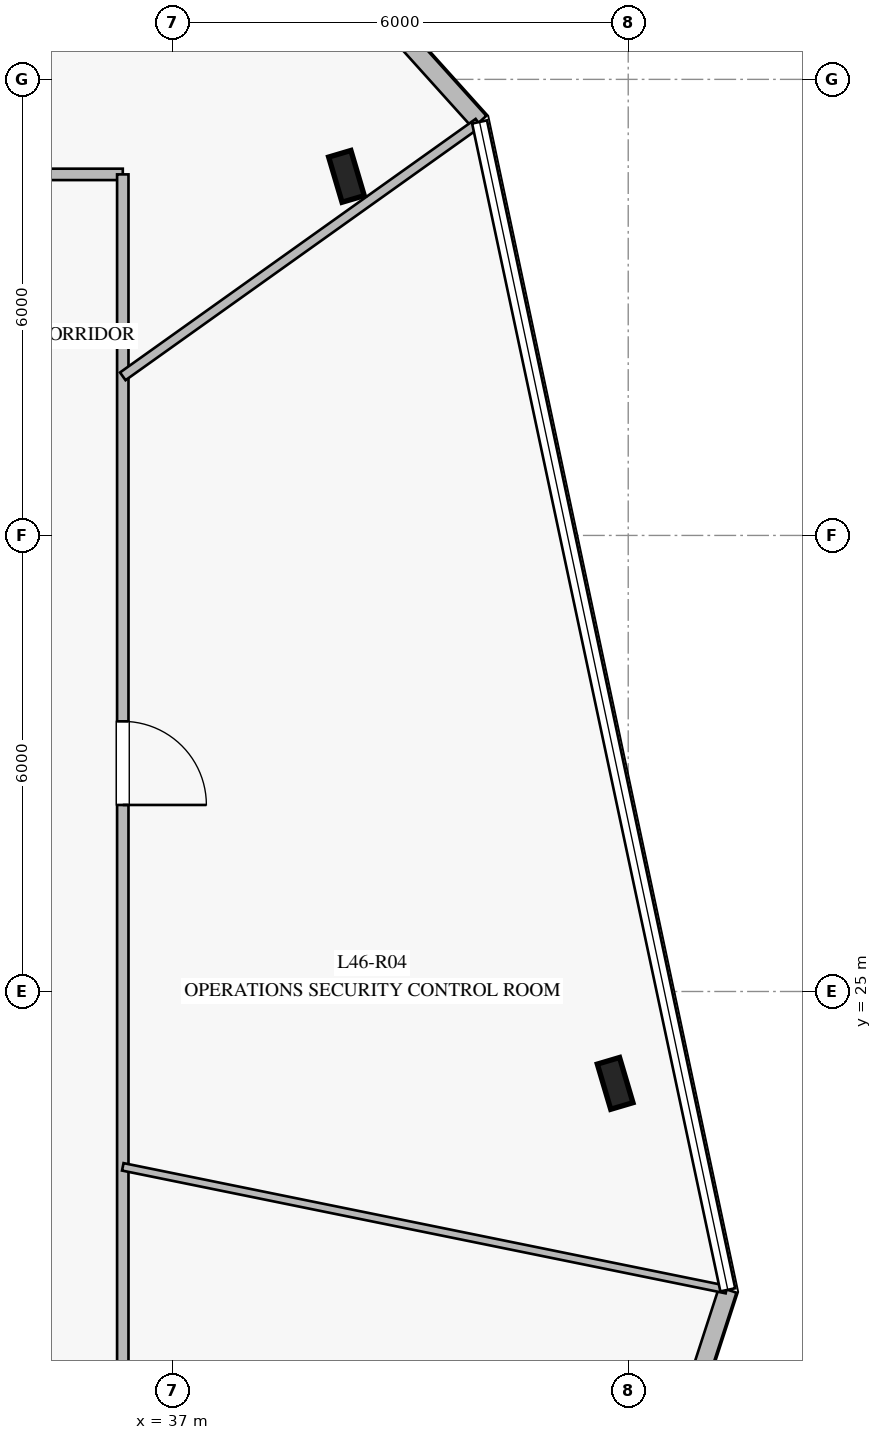
"""IFC4 building model, lengths in metres.
Left out: names, types, materials, properties, quantities, classifications, styles, units other than length and angle.
Written with IfcOpenShell. Run it as: python <this file> out.ifc"""

import sys

from ifc_helpers import new_model, si_unit, direction, frame, frame_2d, origin, origin_2d, place, context, subcontext, project, spatial, rectangle, i_section, extrude, element, fill, save


model = new_model("IFC4")
c1 = context("Model", 3, precision=1e-05, world=origin(), true_north=direction((0.0, 1.0)))
c2 = subcontext(c1, "Body", "Model", "MODEL_VIEW")
j1 = project(units=[si_unit("LENGTHUNIT", "METRE"), si_unit("PLANEANGLEUNIT", "RADIAN")], contexts=[c1])
p1 = place(None, origin())
s1 = spatial("IfcSite", under=j1, at=p1, CompositionType="ELEMENT")
p2 = place(p1, origin())
s2 = spatial("IfcBuilding", under=s1, at=p2, CompositionType="ELEMENT")
p3 = place(p2, frame((0.0, 0.0, 192.8)))
s3 = spatial("IfcBuildingStorey", under=s2, at=p3, CompositionType="ELEMENT", Elevation=192.8)
for number, where, z_axis, x_axis in (
    (1, (42.828, 23.791, 0.0), (0.0, 0.0, 1.0), (-0.284, 0.959, 0.0)),
    (2, (39.293, 35.724, 0.0), (0.0, 0.0, 1.0), (-0.284, 0.959, 0.0)),
):
    element("IfcColumn", number, at=place(p3, frame(where, z_axis=z_axis, x_axis=x_axis)), inside=s3, PredefinedType="COLUMN", context=c2, shape_type="SweptSolid", body=[
        extrude(i_section(OverallWidth=0.305, OverallDepth=0.62, WebThickness=0.021, FlangeThickness=0.04, at=origin_2d()), origin(), (0.0, 0.0, 1.0), 4.0),
    ])
p4 = place(p3, frame((42.929, 16.825, 0.0), z_axis=(0.0, 0.0, 1.0), x_axis=(0.309056424215, 0.95104370386, 0.0)))
e3 = element("IfcWall", 3, at=p4, inside=s3, PredefinedType="STANDARD", context=c2, shape_type="SweptSolid", body=[
    extrude(rectangle(XDim=4.469, YDim=0.24, at=frame_2d((2.234, 0.0))), origin(), (0.0, 0.0, 1.0), 3.78),
])
p5 = place(p3, frame((41.044, 36.44, 0.0), z_axis=(0.0, 0.0, 1.0), x_axis=(-0.669203190827, 0.74307946371, 0.0)))
e4 = element("IfcWall", 4, at=p5, inside=s3, PredefinedType="STANDARD", context=c2, shape_type="SweptSolid", body=[
    extrude(rectangle(XDim=4.468, YDim=0.24, at=frame_2d((2.234, 0.0))), origin(), (0.0, 0.0, 1.0), 3.78),
])
p6 = place(p3, frame((13.65, 35.75, 0.0), z_axis=(0.0, 0.0, 1.0), x_axis=(1.0, 0.0, 0.0)))
e5 = element("IfcWall", 5, at=p6, inside=s3, PredefinedType="PARTITIONING", context=c2, shape_type="SweptSolid", body=[
    extrude(rectangle(XDim=22.7, YDim=0.15, at=frame_2d((11.35, 0.0))), origin(), (0.0, 0.0, 1.0), 3.05),
])
p7 = place(p6, frame((17.131, 0.0, 0.0)))
e6 = element("IfcOpeningElement", 6, at=p7, cuts=e5, PredefinedType="OPENING", context=c2, shape_type="SweptSolid", body=[
    extrude(rectangle(XDim=1.1, YDim=2.2, at=frame_2d((0.55, 1.1))), frame((0.0, 0.085, 0.0), z_axis=(0.0, -1.0, 0.0), x_axis=(1.0, 0.0, 0.0)), (0.0, 0.0, 1.0), 0.17),
])
p8 = place(p6, frame((8.023, 0.0, 0.0)))
e7 = element("IfcOpeningElement", 7, at=p8, cuts=e5, PredefinedType="OPENING", context=c2, shape_type="SweptSolid", body=[
    extrude(rectangle(XDim=1.1, YDim=2.2, at=frame_2d((0.55, 1.1))), frame((0.0, 0.085, 0.0), z_axis=(0.0, -1.0, 0.0), x_axis=(1.0, 0.0, 0.0)), (0.0, 0.0, 1.0), 0.17),
])
p9 = place(p6, frame((1.69, 0.0, 0.0)))
e8 = element("IfcOpeningElement", 8, at=p9, cuts=e5, PredefinedType="OPENING", context=c2, shape_type="SweptSolid", body=[
    extrude(rectangle(XDim=1.1, YDim=2.2, at=frame_2d((0.55, 1.1))), frame((0.0, 0.085, 0.0), z_axis=(0.0, -1.0, 0.0), x_axis=(1.0, 0.0, 0.0)), (0.0, 0.0, 1.0), 0.17),
])
p10 = place(p3, frame((36.35, 35.75, 0.0), z_axis=(0.0, 0.0, 1.0), x_axis=(0.0, -1.0, 0.0)))
e9 = element("IfcWall", 9, at=p10, inside=s3, PredefinedType="PARTITIONING", context=c2, shape_type="SweptSolid", body=[
    extrude(rectangle(XDim=21.5, YDim=0.15, at=frame_2d((10.75, 0.0))), origin(), (0.0, 0.0, 1.0), 3.05),
])
p11 = place(p10, frame((16.462, 0.0, 0.0)))
e10 = element("IfcOpeningElement", 10, at=p11, cuts=e9, PredefinedType="OPENING", context=c2, shape_type="SweptSolid", body=[
    extrude(rectangle(XDim=1.1, YDim=2.2, at=frame_2d((0.55, 1.1))), frame((0.0, 0.085, 0.0), z_axis=(0.0, -1.0, 0.0), x_axis=(1.0, 0.0, 0.0)), (0.0, 0.0, 1.0), 0.17),
])
p12 = place(p10, frame((7.196, 0.0, 0.0)))
e11 = element("IfcOpeningElement", 11, at=p12, cuts=e9, PredefinedType="OPENING", context=c2, shape_type="SweptSolid", body=[
    extrude(rectangle(XDim=1.1, YDim=2.2, at=frame_2d((0.55, 1.1))), frame((0.0, 0.085, 0.0), z_axis=(0.0, -1.0, 0.0), x_axis=(1.0, 0.0, 0.0)), (0.0, 0.0, 1.0), 0.17),
])
p13 = place(p3, frame((36.35, 22.693, 0.0), z_axis=(0.0, 0.0, 1.0), x_axis=(0.979938257783, -0.199301306901, 0.0)))
e12 = element("IfcWall", 12, at=p13, inside=s3, PredefinedType="MOVABLE", context=c2, shape_type="SweptSolid", body=[
    extrude(rectangle(XDim=8.104, YDim=0.1, at=frame_2d((4.052, 0.0))), origin(), (0.0, 0.0, 1.0), 3.18),
])
p14 = place(p3, frame((36.35, 33.093, 0.0), z_axis=(0.0, 0.0, 1.0), x_axis=(0.814241268053, 0.58052662075, 0.0)))
e13 = element("IfcWall", 13, at=p14, inside=s3, PredefinedType="PARTITIONING", context=c2, shape_type="SweptSolid", body=[
    extrude(rectangle(XDim=5.746, YDim=0.125, at=frame_2d((2.873, 0.0))), origin(), (0.0, 0.0, 1.0), 3.18),
])
p15 = place(p12, origin())
e14 = element("IfcDoor", 14, at=p15, inside=s3, OperationType="SINGLE_SWING_RIGHT", PredefinedType="DOOR", context=c2, shape_type="SweptSolid", body=[
    extrude(rectangle(XDim=1.1, YDim=2.2, at=frame_2d((0.55, 1.1))), frame((0.0, 0.025, 0.0), z_axis=(0.0, -1.0, 0.0), x_axis=(1.0, 0.0, 0.0)), (0.0, 0.0, 1.0), 0.05),
])
fill(e11, e14)
save(model, sys.argv[1])
